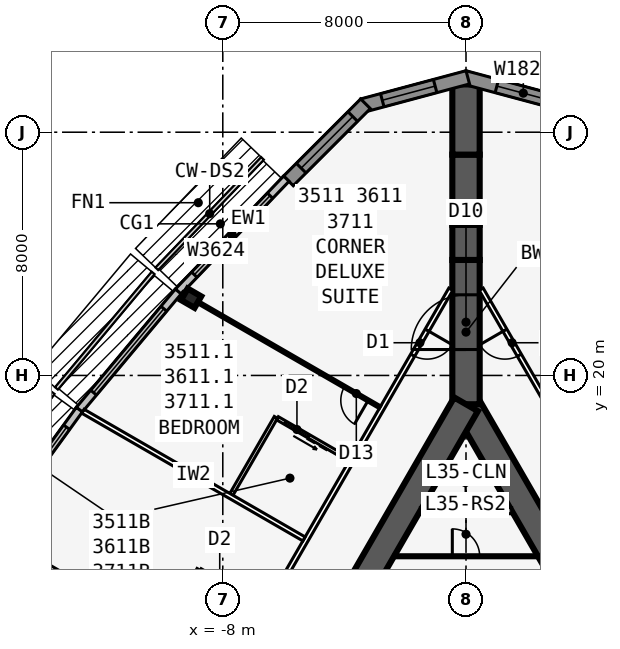
"""IFC4 building model, lengths in metres.
Left out: names, types, materials, properties, quantities, classifications, styles, units other than length and angle.
Written with IfcOpenShell. Run it as: python <this file> out.ifc"""

import sys

from ifc_helpers import new_model, si_unit, direction, frame, frame_2d, origin, origin_2d, place, context, subcontext, project, spatial, polyline, rectangle, i_section, outline, extrude, element, fill, save


model = new_model("IFC4")
c1 = context("Model", 3, precision=1e-05, world=origin(), true_north=direction((0.0, 1.0)))
c2 = subcontext(c1, "Body", "Model", "MODEL_VIEW")
j1 = project(units=[si_unit("LENGTHUNIT", "METRE"), si_unit("PLANEANGLEUNIT", "RADIAN")], contexts=[c1])
p1 = place(None, origin())
s1 = spatial("IfcSite", under=j1, at=p1, CompositionType="ELEMENT")
p2 = place(p1, origin())
s2 = spatial("IfcBuilding", under=s1, at=p2, CompositionType="ELEMENT")
p3 = place(p2, frame((0.0, 0.0, 135.1)))
s3 = spatial("IfcBuildingStorey", under=s2, at=p3, CompositionType="ELEMENT", Elevation=135.1)
p4 = place(p3, frame((16.5, -9.526, 0.0), z_axis=(0.0, 0.0, 1.0), x_axis=(-0.499999749417, 0.866025548458, 0.0)))
e1 = element("IfcWall", 1, at=p4, inside=s3, PredefinedType="SHEAR", context=c2, shape_type="SweptSolid", body=[
    extrude(rectangle(XDim=33.0, YDim=0.9, at=frame_2d((16.5, 0.0))), origin(), (0.0, 0.0, 1.0), 3.4),
])
p5 = place(p4, frame((14.15, 0.0, 0.0)))
e2 = element("IfcOpeningElement", 2, at=p5, cuts=e1, PredefinedType="OPENING", context=c2, shape_type="SweptSolid", body=[
    extrude(rectangle(XDim=1.8, YDim=2.13, at=frame_2d((0.9, 1.065))), frame((0.0, 0.46, 0.0), z_axis=(0.0, -1.0, 0.0), x_axis=(1.0, 0.0, 0.0)), (0.0, 0.0, 1.0), 0.92),
])
p6 = place(p4, frame((12.6, 0.0, 0.0)))
e3 = element("IfcOpeningElement", 3, at=p6, cuts=e1, PredefinedType="OPENING", context=c2, shape_type="SweptSolid", body=[
    extrude(rectangle(XDim=1.0, YDim=2.13, at=frame_2d((0.5, 1.065))), frame((0.0, 0.46, 0.0), z_axis=(0.0, -1.0, 0.0), x_axis=(1.0, 0.0, 0.0)), (0.0, 0.0, 1.0), 0.92),
])
p7 = place(p3, frame((0.0, 19.052, 0.0), z_axis=(0.0, 0.0, 1.0), x_axis=(-0.499999749417, -0.866025548458, 0.0)))
e4 = element("IfcWall", 4, at=p7, inside=s3, PredefinedType="SHEAR", context=c2, shape_type="SweptSolid", body=[
    extrude(rectangle(XDim=33.0, YDim=0.9, at=frame_2d((16.5, 0.0))), origin(), (0.0, 0.0, 1.0), 3.4),
])
p8 = place(p7, frame((14.15, 0.0, 0.0)))
e5 = element("IfcOpeningElement", 5, at=p8, cuts=e4, PredefinedType="OPENING", context=c2, shape_type="SweptSolid", body=[
    extrude(rectangle(XDim=1.8, YDim=2.13, at=frame_2d((0.9, 1.065))), frame((0.0, 0.46, 0.0), z_axis=(0.0, -1.0, 0.0), x_axis=(1.0, 0.0, 0.0)), (0.0, 0.0, 1.0), 0.92),
])
p9 = place(p7, frame((12.6, 0.0, 0.0)))
e6 = element("IfcOpeningElement", 6, at=p9, cuts=e4, PredefinedType="OPENING", context=c2, shape_type="SweptSolid", body=[
    extrude(rectangle(XDim=1.0, YDim=2.13, at=frame_2d((0.5, 1.065))), frame((0.0, 0.46, 0.0), z_axis=(0.0, -1.0, 0.0), x_axis=(1.0, 0.0, 0.0)), (0.0, 0.0, 1.0), 0.92),
])
p10 = place(p3, frame((0.0, 19.052, 0.0), z_axis=(0.0, 0.0, 1.0), x_axis=(0.0, 1.0, 0.0)))
e7 = element("IfcWall", 7, at=p10, inside=s3, PredefinedType="SHEAR", context=c2, shape_type="SweptSolid", body=[
    extrude(rectangle(XDim=4.746, YDim=0.9, at=frame_2d((2.373, 0.0))), origin(), (0.0, 0.0, 1.0), 3.4),
])
p11 = place(p10, frame((1.8, 0.0, 0.0)))
e8 = element("IfcOpeningElement", 8, at=p11, cuts=e7, PredefinedType="OPENING", context=c2, shape_type="SweptSolid", body=[
    extrude(rectangle(XDim=1.8, YDim=2.13, at=frame_2d((0.9, 1.065))), frame((0.0, 0.46, 0.0), z_axis=(0.0, -1.0, 0.0), x_axis=(1.0, 0.0, 0.0)), (0.0, 0.0, 1.0), 0.92),
])
p12 = place(p3, frame((0.0, 23.799, 0.0), z_axis=(0.0, 0.0, 1.0), x_axis=(0.0, 1.0, 0.0)))
e9 = element("IfcWall", 9, at=p12, inside=s3, PredefinedType="SHEAR", context=c2, shape_type="SweptSolid", body=[
    extrude(rectangle(XDim=1.155, YDim=0.9, at=frame_2d((0.577, 0.0))), origin(), (0.0, 0.0, 1.0), 3.4),
])
p13 = place(p3, frame((0.0, 24.953, 0.0), z_axis=(0.0, 0.0, 1.0), x_axis=(0.0, 1.0, 0.0)))
e10 = element("IfcWall", 10, at=p13, inside=s3, PredefinedType="SHEAR", context=c2, shape_type="SweptSolid", body=[
    extrude(rectangle(XDim=2.309, YDim=0.9, at=frame_2d((1.155, 0.0))), origin(), (0.0, 0.0, 1.0), 3.4),
])
p14 = place(p3, frame((0.0, 27.263, 0.0), z_axis=(0.0, 0.0, 1.0), x_axis=(0.0, 1.0, 0.0)))
e11 = element("IfcWall", 11, at=p14, inside=s3, PredefinedType="SHEAR", context=c2, shape_type="SweptSolid", body=[
    extrude(rectangle(XDim=2.31, YDim=0.9, at=frame_2d((1.155, 0.0))), origin(), (0.0, 0.0, 1.0), 3.4),
])
p15 = place(p3, frame((-9.041, 22.541, 0.0), z_axis=(0.0, 0.0, 1.0), x_axis=(-0.5, -0.866025403784, 0.0)))
e12 = element("IfcColumn", 12, at=p15, inside=s3, PredefinedType="COLUMN", context=c2, shape_type="SweptSolid", body=[
    extrude(i_section(OverallWidth=0.437, OverallDepth=0.513, WebThickness=0.061, FlangeThickness=0.097, at=origin_2d()), origin(), (0.0, 0.0, 1.0), 3.4),
])
p16 = place(p3, frame((3.406, 28.877, 0.0), z_axis=(0.0, 0.0, 1.0), x_axis=(-0.965924653531, 0.258823421857, 0.0)))
e13 = element("IfcWall", 13, at=p16, inside=s3, PredefinedType="SOLIDWALL", context=c2, shape_type="SweptSolid", body=[
    extrude(outline(polyline([(3.586, 0.225), (3.527, 0.225), (3.035, 0.093), (3.0, 0.225), (0.0, 0.225), (0.0, -0.225), (3.586, -0.225), (3.586, 0.225)])), origin(), (0.0, 0.0, 1.0), 3.235),
])
p17 = place(p16, frame((0.675, 0.0, 0.45)))
e14 = element("IfcOpeningElement", 14, at=p17, cuts=e13, PredefinedType="OPENING", context=c2, shape_type="SweptSolid", body=[
    extrude(rectangle(XDim=1.8, YDim=2.4, at=frame_2d((0.9, 1.2))), frame((0.0, 0.235, 0.0), z_axis=(0.0, -1.0, 0.0), x_axis=(1.0, 0.0, 0.0)), (0.0, 0.0, 1.0), 0.47),
])
p18 = place(p3, frame((0.058, 29.805, 0.0), z_axis=(0.0, 0.0, 1.0), x_axis=(-0.965924653531, -0.258823421857, 0.0)))
e15 = element("IfcWall", 15, at=p18, inside=s3, PredefinedType="SOLIDWALL", context=c2, shape_type="SweptSolid", body=[
    extrude(outline(polyline([(3.586, 0.225), (0.586, 0.225), (0.551, 0.093), (0.06, 0.225), (0.0, 0.225), (0.0, -0.225), (3.586, -0.225), (3.586, 0.225)])), origin(), (0.0, 0.0, 1.0), 3.235),
])
p19 = place(p18, frame((1.111, 0.0, 0.45)))
e16 = element("IfcOpeningElement", 16, at=p19, cuts=e15, PredefinedType="OPENING", context=c2, shape_type="SweptSolid", body=[
    extrude(rectangle(XDim=1.8, YDim=2.4, at=frame_2d((0.9, 1.2))), frame((0.0, 0.235, 0.0), z_axis=(0.0, -1.0, 0.0), x_axis=(1.0, 0.0, 0.0)), (0.0, 0.0, 1.0), 0.47),
])
p20 = place(p3, frame((-3.305, 28.935, 0.0), z_axis=(0.0, 0.0, 1.0), x_axis=(-0.707106781187, -0.707106781187, 0.0)))
e17 = element("IfcWall", 17, at=p20, inside=s3, PredefinedType="SOLIDWALL", context=c2, shape_type="SweptSolid", body=[
    extrude(rectangle(XDim=3.586, YDim=0.45, at=frame_2d((1.793, 0.0))), origin(), (0.0, 0.0, 1.0), 3.235),
])
p21 = place(p20, frame((0.593, 0.0, 0.45)))
e18 = element("IfcOpeningElement", 18, at=p21, cuts=e17, PredefinedType="OPENING", context=c2, shape_type="SweptSolid", body=[
    extrude(rectangle(XDim=2.4, YDim=2.4, at=frame_2d((1.2, 1.2))), frame((0.0, 0.235, 0.0), z_axis=(0.0, -1.0, 0.0), x_axis=(1.0, 0.0, 0.0)), (0.0, 0.0, 1.0), 0.47),
])
p22 = place(p3, frame((-5.91, 26.472, 0.0), z_axis=(0.0, 0.0, 1.0), x_axis=(-0.691719937936, -0.722165858693, 0.0)))
e19 = element("IfcWall", 19, at=p22, inside=s3, PredefinedType="STANDARD", context=c2, shape_type="SweptSolid", body=[
    extrude(rectangle(XDim=5.148, YDim=0.25, at=frame_2d((2.574, 0.0))), origin(), (0.0, 0.0, 1.0), 3.235),
])
p23 = place(p22, frame((0.774, 0.0, 0.45)))
e20 = element("IfcOpeningElement", 20, at=p23, cuts=e19, PredefinedType="OPENING", context=c2, shape_type="SweptSolid", body=[
    extrude(rectangle(XDim=3.6, YDim=2.4, at=frame_2d((1.8, 1.2))), frame((0.0, 0.135, 0.0), z_axis=(0.0, -1.0, 0.0), x_axis=(1.0, 0.0, 0.0)), (0.0, 0.0, 1.0), 0.27),
])
p24 = place(p3, frame((-9.465, 22.76, 0.0), z_axis=(0.0, 0.0, 1.0), x_axis=(-0.641810386606, -0.766863369607, 0.0)))
e21 = element("IfcWall", 21, at=p24, inside=s3, PredefinedType="STANDARD", context=c2, shape_type="SweptSolid", body=[
    extrude(rectangle(XDim=5.076, YDim=0.25, at=frame_2d((2.538, 0.0))), origin(), (0.0, 0.0, 1.0), 3.235),
])
p25 = place(p24, frame((0.738, 0.0, 0.45)))
e22 = element("IfcOpeningElement", 22, at=p25, cuts=e21, PredefinedType="OPENING", context=c2, shape_type="SweptSolid", body=[
    extrude(rectangle(XDim=3.6, YDim=2.4, at=frame_2d((1.8, 1.2))), frame((0.0, 0.135, 0.0), z_axis=(0.0, -1.0, 0.0), x_axis=(1.0, 0.0, 0.0)), (0.0, 0.0, 1.0), 0.27),
])
p26 = place(p3, frame((-12.718, 18.875, 0.0), z_axis=(0.0, 0.0, 1.0), x_axis=(-0.587669188412, -0.809101307001, 0.0)))
e23 = element("IfcWall", 23, at=p26, inside=s3, PredefinedType="STANDARD", context=c2, shape_type="SweptSolid", body=[
    extrude(rectangle(XDim=5.028, YDim=0.25, at=frame_2d((2.514, 0.0))), origin(), (0.0, 0.0, 1.0), 3.235),
])
p27 = place(p26, frame((0.714, 0.0, 0.45)))
e24 = element("IfcOpeningElement", 24, at=p27, cuts=e23, PredefinedType="OPENING", context=c2, shape_type="SweptSolid", body=[
    extrude(rectangle(XDim=3.6, YDim=2.4, at=frame_2d((1.8, 1.2))), frame((0.0, 0.135, 0.0), z_axis=(0.0, -1.0, 0.0), x_axis=(1.0, 0.0, 0.0)), (0.0, 0.0, 1.0), 0.27),
])
p28 = place(p3, frame((20.027, -10.985, 0.0), z_axis=(0.0, 0.0, 1.0), x_axis=(-0.500001677587, 0.866024435227, 0.0)))
e25 = element("IfcWall", 25, at=p28, inside=s3, PredefinedType="PARTITIONING", context=c2, shape_type="SweptSolid", body=[
    extrude(rectangle(XDim=39.054, YDim=0.15, at=frame_2d((19.527, 0.0))), origin(), (0.0, 0.0, 1.0), 3.235),
])
p29 = place(p28, frame((1.558, 0.0, 0.0)))
e26 = element("IfcOpeningElement", 26, at=p29, cuts=e25, PredefinedType="OPENING", context=c2, shape_type="SweptSolid", body=[
    extrude(rectangle(XDim=0.95, YDim=2.13, at=frame_2d((0.475, 1.065))), frame((0.0, 0.085, 0.0), z_axis=(0.0, -1.0, 0.0), x_axis=(1.0, 0.0, 0.0)), (0.0, 0.0, 1.0), 0.17),
])
p30 = place(p28, frame((10.352, 0.0, 0.0)))
e27 = element("IfcOpeningElement", 27, at=p30, cuts=e25, PredefinedType="OPENING", context=c2, shape_type="SweptSolid", body=[
    extrude(rectangle(XDim=0.95, YDim=2.13, at=frame_2d((0.475, 1.065))), frame((0.0, 0.085, 0.0), z_axis=(0.0, -1.0, 0.0), x_axis=(1.0, 0.0, 0.0)), (0.0, 0.0, 1.0), 0.17),
])
p31 = place(p28, frame((17.152, 0.0, 0.0)))
e28 = element("IfcOpeningElement", 28, at=p31, cuts=e25, PredefinedType="OPENING", context=c2, shape_type="SweptSolid", body=[
    extrude(rectangle(XDim=0.95, YDim=2.13, at=frame_2d((0.475, 1.065))), frame((0.0, 0.085, 0.0), z_axis=(0.0, -1.0, 0.0), x_axis=(1.0, 0.0, 0.0)), (0.0, 0.0, 1.0), 0.17),
])
p32 = place(p28, frame((20.952, 0.0, 0.0)))
e29 = element("IfcOpeningElement", 29, at=p32, cuts=e25, PredefinedType="OPENING", context=c2, shape_type="SweptSolid", body=[
    extrude(rectangle(XDim=0.95, YDim=2.13, at=frame_2d((0.475, 1.065))), frame((0.0, 0.085, 0.0), z_axis=(0.0, -1.0, 0.0), x_axis=(1.0, 0.0, 0.0)), (0.0, 0.0, 1.0), 0.17),
])
p33 = place(p28, frame((27.152, 0.0, 0.0)))
e30 = element("IfcOpeningElement", 30, at=p33, cuts=e25, PredefinedType="OPENING", context=c2, shape_type="SweptSolid", body=[
    extrude(rectangle(XDim=0.95, YDim=2.13, at=frame_2d((0.475, 1.065))), frame((0.0, 0.085, 0.0), z_axis=(0.0, -1.0, 0.0), x_axis=(1.0, 0.0, 0.0)), (0.0, 0.0, 1.0), 0.17),
])
p34 = place(p28, frame((36.546, 0.0, 0.0)))
e31 = element("IfcOpeningElement", 31, at=p34, cuts=e25, PredefinedType="OPENING", context=c2, shape_type="SweptSolid", body=[
    extrude(rectangle(XDim=0.95, YDim=2.13, at=frame_2d((0.475, 1.065))), frame((0.0, 0.085, 0.0), z_axis=(0.0, -1.0, 0.0), x_axis=(1.0, 0.0, 0.0)), (0.0, 0.0, 1.0), 0.17),
])
p35 = place(p3, frame((-0.5, 22.836, 0.0), z_axis=(0.0, 0.0, 1.0), x_axis=(-0.500001677587, -0.866024435227, 0.0)))
e32 = element("IfcWall", 32, at=p35, inside=s3, PredefinedType="PARTITIONING", context=c2, shape_type="SweptSolid", body=[
    extrude(rectangle(XDim=39.054, YDim=0.15, at=frame_2d((19.527, 0.0))), origin(), (0.0, 0.0, 1.0), 3.235),
])
p36 = place(p35, frame((1.558, 0.0, 0.0)))
e33 = element("IfcOpeningElement", 33, at=p36, cuts=e32, PredefinedType="OPENING", context=c2, shape_type="SweptSolid", body=[
    extrude(rectangle(XDim=0.95, YDim=2.13, at=frame_2d((0.475, 1.065))), frame((0.0, 0.085, 0.0), z_axis=(0.0, -1.0, 0.0), x_axis=(1.0, 0.0, 0.0)), (0.0, 0.0, 1.0), 0.17),
])
p37 = place(p35, frame((10.952, 0.0, 0.0)))
e34 = element("IfcOpeningElement", 34, at=p37, cuts=e32, PredefinedType="OPENING", context=c2, shape_type="SweptSolid", body=[
    extrude(rectangle(XDim=0.95, YDim=2.13, at=frame_2d((0.475, 1.065))), frame((0.0, 0.085, 0.0), z_axis=(0.0, -1.0, 0.0), x_axis=(1.0, 0.0, 0.0)), (0.0, 0.0, 1.0), 0.17),
])
p38 = place(p35, frame((17.752, 0.0, 0.0)))
e35 = element("IfcOpeningElement", 35, at=p38, cuts=e32, PredefinedType="OPENING", context=c2, shape_type="SweptSolid", body=[
    extrude(rectangle(XDim=0.95, YDim=2.13, at=frame_2d((0.475, 1.065))), frame((0.0, 0.085, 0.0), z_axis=(0.0, -1.0, 0.0), x_axis=(1.0, 0.0, 0.0)), (0.0, 0.0, 1.0), 0.17),
])
p39 = place(p35, frame((21.552, 0.0, 0.0)))
e36 = element("IfcOpeningElement", 36, at=p39, cuts=e32, PredefinedType="OPENING", context=c2, shape_type="SweptSolid", body=[
    extrude(rectangle(XDim=0.95, YDim=2.13, at=frame_2d((0.475, 1.065))), frame((0.0, 0.085, 0.0), z_axis=(0.0, -1.0, 0.0), x_axis=(1.0, 0.0, 0.0)), (0.0, 0.0, 1.0), 0.17),
])
p40 = place(p35, frame((30.952, 0.0, 0.0)))
e37 = element("IfcOpeningElement", 37, at=p40, cuts=e32, PredefinedType="OPENING", context=c2, shape_type="SweptSolid", body=[
    extrude(rectangle(XDim=0.95, YDim=2.13, at=frame_2d((0.475, 1.065))), frame((0.0, 0.085, 0.0), z_axis=(0.0, -1.0, 0.0), x_axis=(1.0, 0.0, 0.0)), (0.0, 0.0, 1.0), 0.17),
])
p41 = place(p35, frame((37.752, 0.0, 0.0)))
e38 = element("IfcOpeningElement", 38, at=p41, cuts=e32, PredefinedType="OPENING", context=c2, shape_type="SweptSolid", body=[
    extrude(rectangle(XDim=0.95, YDim=2.13, at=frame_2d((0.475, 1.065))), frame((0.0, 0.085, 0.0), z_axis=(0.0, -1.0, 0.0), x_axis=(1.0, 0.0, 0.0)), (0.0, 0.0, 1.0), 0.17),
])
p42 = place(p3, frame((-2.829, 18.954, 0.0), z_axis=(0.0, 0.0, 1.0), x_axis=(-0.866015739374, 0.500016738876, 0.0)))
e39 = element("IfcWall", 39, at=p42, inside=s3, PredefinedType="PARTITIONING", context=c2, shape_type="SweptSolid", body=[
    extrude(rectangle(XDim=7.516, YDim=0.1, at=frame_2d((3.758, 0.0))), origin(), (0.0, 0.0, 1.0), 2.389),
])
p43 = place(p42, frame((0.45, 0.0, 0.0)))
e40 = element("IfcOpeningElement", 40, at=p43, cuts=e39, PredefinedType="OPENING", context=c2, shape_type="SweptSolid", body=[
    extrude(rectangle(XDim=0.9, YDim=2.13, at=frame_2d((0.45, 1.065))), frame((0.0, 0.06, 0.0), z_axis=(0.0, -1.0, 0.0), x_axis=(1.0, 0.0, 0.0)), (0.0, 0.0, 1.0), 0.12),
])
p44 = place(p3, frame((-5.329, 14.623, 0.0), z_axis=(0.0, 0.0, 1.0), x_axis=(-0.866011723728, 0.500023693804, 0.0)))
e41 = element("IfcWall", 41, at=p44, inside=s3, PredefinedType="PARTITIONING", context=c2, shape_type="SweptSolid", body=[
    extrude(rectangle(XDim=8.395, YDim=0.15, at=frame_2d((4.198, 0.0))), origin(), (0.0, 0.0, 1.0), 2.389),
])
p45 = place(p3, frame((-7.829, 10.293, 0.0), z_axis=(0.0, 0.0, 1.0), x_axis=(-0.866027015393, 0.499997208602, 0.0)))
e42 = element("IfcWall", 42, at=p45, inside=s3, PredefinedType="PARTITIONING", context=c2, shape_type="SweptSolid", body=[
    extrude(rectangle(XDim=8.922, YDim=0.15, at=frame_2d((4.461, 0.0))), origin(), (0.0, 0.0, 1.0), 2.389),
])
p46 = place(p3, frame((-6.253, 18.622, 0.0), z_axis=(0.0, 0.0, 1.0), x_axis=(-0.499990139034, -0.866031096941, 0.0)))
e43 = element("IfcWall", 43, at=p46, inside=s3, PredefinedType="PLUMBINGWALL", context=c2, shape_type="SweptSolid", body=[
    extrude(rectangle(XDim=3.0, YDim=0.12, at=frame_2d((1.5, 0.0))), origin(), (0.0, 0.0, 1.0), 3.235),
])
p47 = place(p3, frame((-3.829, 17.221, 0.0), z_axis=(0.0, 0.0, 1.0), x_axis=(-0.865997131366, 0.500048966069, 0.0)))
e44 = element("IfcWall", 44, at=p47, inside=s3, PredefinedType="PLUMBINGWALL", context=c2, shape_type="SweptSolid", body=[
    extrude(rectangle(XDim=2.74, YDim=0.12, at=frame_2d((1.37, 0.0))), origin(), (0.0, 0.0, 1.0), 3.235),
])
p48 = place(p47, frame((1.55, 0.0, 0.0)))
e45 = element("IfcOpeningElement", 45, at=p48, cuts=e44, PredefinedType="OPENING", context=c2, shape_type="SweptSolid", body=[
    extrude(rectangle(XDim=0.9, YDim=2.13, at=frame_2d((0.45, 1.065))), frame((0.0, 0.07, 0.0), z_axis=(0.0, -1.0, 0.0), x_axis=(1.0, 0.0, 0.0)), (0.0, 0.0, 1.0), 0.14),
])
p49 = place(p3, frame((-8.793, 13.622, 0.0), z_axis=(0.0, 0.0, 1.0), x_axis=(-0.500001309137, -0.866024647952, 0.0)))
e46 = element("IfcWall", 46, at=p49, inside=s3, PredefinedType="PLUMBINGWALL", context=c2, shape_type="SweptSolid", body=[
    extrude(rectangle(XDim=2.4, YDim=0.12, at=frame_2d((1.2, 0.0))), origin(), (0.0, 0.0, 1.0), 3.235),
])
p50 = place(p3, frame((-6.628, 12.372, 0.0), z_axis=(0.0, 0.0, 1.0), x_axis=(-0.866005645448, 0.500034220881, 0.0)))
e47 = element("IfcWall", 47, at=p50, inside=s3, PredefinedType="PLUMBINGWALL", context=c2, shape_type="SweptSolid", body=[
    extrude(rectangle(XDim=2.44, YDim=0.12, at=frame_2d((1.22, 0.0))), origin(), (0.0, 0.0, 1.0), 3.235),
])
p51 = place(p50, frame((1.25, 0.0, 0.0)))
e48 = element("IfcOpeningElement", 48, at=p51, cuts=e47, PredefinedType="OPENING", context=c2, shape_type="SweptSolid", body=[
    extrude(rectangle(XDim=0.9, YDim=2.13, at=frame_2d((0.45, 1.065))), frame((0.0, 0.07, 0.0), z_axis=(0.0, -1.0, 0.0), x_axis=(1.0, 0.0, 0.0)), (0.0, 0.0, 1.0), 0.14),
])
p52 = place(p3, frame((-1.501, 15.552, 0.0), z_axis=(0.0, 0.0, 1.0), x_axis=(1.0, 0.0, 0.0)))
e49 = element("IfcWall", 49, at=p52, inside=s3, PredefinedType="SOLIDWALL", context=c2, shape_type="SweptSolid", body=[
    extrude(rectangle(XDim=3.002, YDim=0.2, at=frame_2d((1.501, 0.0))), origin(), (0.0, 0.0, 1.0), 3.235),
])
p53 = place(p3, frame((-2.367, 14.052, 0.0), z_axis=(0.0, 0.0, 1.0), x_axis=(1.0, 0.0, 0.0)))
e50 = element("IfcWall", 50, at=p53, inside=s3, PredefinedType="PARTITIONING", context=c2, shape_type="SweptSolid", body=[
    extrude(rectangle(XDim=4.734, YDim=0.1, at=frame_2d((2.367, 0.0))), origin(), (0.0, 0.0, 1.0), 3.235),
])
p54 = place(p53, frame((1.917, 0.0, 0.0)))
e51 = element("IfcOpeningElement", 51, at=p54, cuts=e50, PredefinedType="OPENING", context=c2, shape_type="SweptSolid", body=[
    extrude(rectangle(XDim=0.9, YDim=2.13, at=frame_2d((0.45, 1.065))), frame((0.0, 0.06, 0.0), z_axis=(0.0, -1.0, 0.0), x_axis=(1.0, 0.0, 0.0)), (0.0, 0.0, 1.0), 0.12),
])
p55 = place(p17, origin())
e52 = element("IfcWindow", 52, at=p55, inside=s3, PartitioningType="SINGLE_PANEL", PredefinedType="WINDOW", context=c2, shape_type="SweptSolid", body=[
    extrude(rectangle(XDim=1.8, YDim=2.4, at=frame_2d((0.9, 1.2))), frame((0.0, 0.03, 0.0), z_axis=(0.0, -1.0, 0.0), x_axis=(1.0, 0.0, 0.0)), (0.0, 0.0, 1.0), 0.06),
])
fill(e14, e52)
p56 = place(p19, origin())
e53 = element("IfcWindow", 53, at=p56, inside=s3, PartitioningType="SINGLE_PANEL", PredefinedType="WINDOW", context=c2, shape_type="SweptSolid", body=[
    extrude(rectangle(XDim=1.8, YDim=2.4, at=frame_2d((0.9, 1.2))), frame((0.0, 0.03, 0.0), z_axis=(0.0, -1.0, 0.0), x_axis=(1.0, 0.0, 0.0)), (0.0, 0.0, 1.0), 0.06),
])
fill(e16, e53)
p57 = place(p21, origin())
e54 = element("IfcWindow", 54, at=p57, inside=s3, PartitioningType="SINGLE_PANEL", PredefinedType="WINDOW", context=c2, shape_type="SweptSolid", body=[
    extrude(rectangle(XDim=2.4, YDim=2.4, at=frame_2d((1.2, 1.2))), frame((0.0, 0.03, 0.0), z_axis=(0.0, -1.0, 0.0), x_axis=(1.0, 0.0, 0.0)), (0.0, 0.0, 1.0), 0.06),
])
fill(e18, e54)
p58 = place(p23, origin())
e55 = element("IfcWindow", 55, at=p58, inside=s3, PartitioningType="SINGLE_PANEL", PredefinedType="WINDOW", context=c2, shape_type="SweptSolid", body=[
    extrude(rectangle(XDim=3.6, YDim=2.4, at=frame_2d((1.8, 1.2))), frame((0.0, 0.03, 0.0), z_axis=(0.0, -1.0, 0.0), x_axis=(1.0, 0.0, 0.0)), (0.0, 0.0, 1.0), 0.06),
])
fill(e20, e55)
p59 = place(p25, origin())
e56 = element("IfcWindow", 56, at=p59, inside=s3, PartitioningType="SINGLE_PANEL", PredefinedType="WINDOW", context=c2, shape_type="SweptSolid", body=[
    extrude(rectangle(XDim=3.6, YDim=2.4, at=frame_2d((1.8, 1.2))), frame((0.0, 0.03, 0.0), z_axis=(0.0, -1.0, 0.0), x_axis=(1.0, 0.0, 0.0)), (0.0, 0.0, 1.0), 0.06),
])
fill(e22, e56)
p60 = place(p27, origin())
e57 = element("IfcWindow", 57, at=p60, inside=s3, PartitioningType="SINGLE_PANEL", PredefinedType="WINDOW", context=c2, shape_type="SweptSolid", body=[
    extrude(rectangle(XDim=3.6, YDim=2.4, at=frame_2d((1.8, 1.2))), frame((0.0, 0.03, 0.0), z_axis=(0.0, -1.0, 0.0), x_axis=(1.0, 0.0, 0.0)), (0.0, 0.0, 1.0), 0.06),
])
fill(e24, e57)
p61 = place(p34, origin())
e58 = element("IfcDoor", 58, at=p61, inside=s3, OperationType="SINGLE_SWING_RIGHT", PredefinedType="DOOR", context=c2, shape_type="SweptSolid", body=[
    extrude(rectangle(XDim=0.95, YDim=2.13, at=frame_2d((0.475, 1.065))), frame((0.0, 0.025, 0.0), z_axis=(0.0, -1.0, 0.0), x_axis=(1.0, 0.0, 0.0)), (0.0, 0.0, 1.0), 0.05),
])
fill(e31, e58)
p62 = place(p43, origin())
e59 = element("IfcDoor", 59, at=p62, inside=s3, OperationType="SINGLE_SWING_LEFT", PredefinedType="DOOR", context=c2, shape_type="SweptSolid", body=[
    extrude(rectangle(XDim=0.9, YDim=2.13, at=frame_2d((0.45, 1.065))), frame((0.0, 0.025, 0.0), z_axis=(0.0, -1.0, 0.0), x_axis=(1.0, 0.0, 0.0)), (0.0, 0.0, 1.0), 0.05),
])
fill(e40, e59)
p63 = place(p36, origin())
e60 = element("IfcDoor", 60, at=p63, inside=s3, OperationType="SINGLE_SWING_LEFT", PredefinedType="DOOR", context=c2, shape_type="SweptSolid", body=[
    extrude(rectangle(XDim=0.95, YDim=2.13, at=frame_2d((0.475, 1.065))), frame((0.0, 0.025, 0.0), z_axis=(0.0, -1.0, 0.0), x_axis=(1.0, 0.0, 0.0)), (0.0, 0.0, 1.0), 0.05),
])
fill(e33, e60)
p64 = place(p48, origin())
e61 = element("IfcDoor", 61, at=p64, inside=s3, OperationType="SLIDING_TO_LEFT", PredefinedType="DOOR", context=c2, shape_type="SweptSolid", body=[
    extrude(rectangle(XDim=0.9, YDim=2.13, at=frame_2d((0.45, 1.065))), frame((0.0, 0.025, 0.0), z_axis=(0.0, -1.0, 0.0), x_axis=(1.0, 0.0, 0.0)), (0.0, 0.0, 1.0), 0.05),
])
fill(e45, e61)
p65 = place(p11, origin())
e62 = element("IfcDoor", 62, at=p65, inside=s3, OperationType="DOUBLE_DOOR_DOUBLE_SWING", PredefinedType="DOOR", context=c2, shape_type="SweptSolid", body=[
    extrude(rectangle(XDim=1.8, YDim=2.13, at=frame_2d((0.9, 1.065))), frame((0.0, 0.025, 0.0), z_axis=(0.0, -1.0, 0.0), x_axis=(1.0, 0.0, 0.0)), (0.0, 0.0, 1.0), 0.05),
])
fill(e8, e62)
p66 = place(p54, origin())
e63 = element("IfcDoor", 63, at=p66, inside=s3, OperationType="SINGLE_SWING_LEFT", PredefinedType="DOOR", context=c2, shape_type="SweptSolid", body=[
    extrude(rectangle(XDim=0.9, YDim=2.13, at=frame_2d((0.45, 1.065))), frame((0.0, 0.025, 0.0), z_axis=(0.0, -1.0, 0.0), x_axis=(1.0, 0.0, 0.0)), (0.0, 0.0, 1.0), 0.05),
])
fill(e51, e63)
save(model, sys.argv[1])
